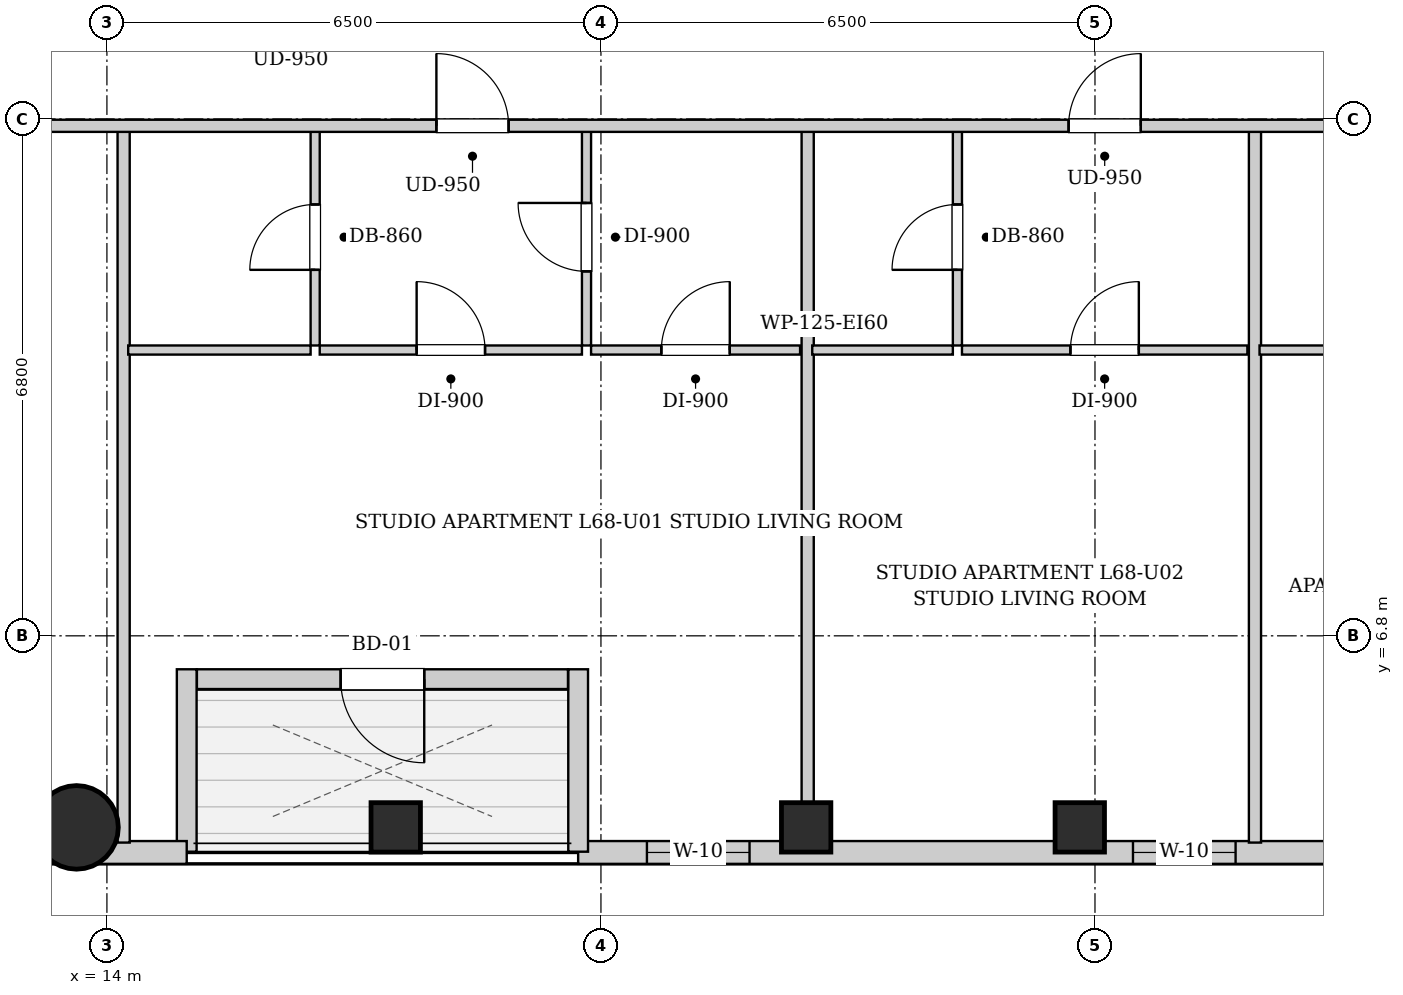
"""IFC4 building model, lengths in metres.
Left out: names, types, materials, properties, quantities, classifications, styles, units other than length and angle.
Written with IfcOpenShell. Run it as: python <this file> out.ifc"""

import sys

from ifc_helpers import new_model, si_unit, direction, frame, frame_2d, origin, origin_2d, place, context, subcontext, project, spatial, rectangle, circle, extrude, element, fill, save


model = new_model("IFC4")
c1 = context("Model", 3, precision=1e-05, world=origin(), true_north=direction((0.0, 1.0)))
c2 = subcontext(c1, "Body", "Model", "MODEL_VIEW")
j1 = project(units=[si_unit("LENGTHUNIT", "METRE"), si_unit("PLANEANGLEUNIT", "RADIAN")], contexts=[c1])
p1 = place(None, origin())
s1 = spatial("IfcSite", under=j1, at=p1, CompositionType="ELEMENT")
p2 = place(p1, origin())
s2 = spatial("IfcBuilding", under=s1, at=p2, CompositionType="ELEMENT")
p3 = place(p2, frame((0.0, 0.0, 234.3)))
s3 = spatial("IfcBuildingStorey", under=s2, at=p3, CompositionType="ELEMENT", Elevation=234.3)
p4 = place(p3, frame((13.6, 4.28, 0.0), z_axis=(0.0, 0.0, 1.0), x_axis=(1.0, 0.0, 0.0)))
e1 = element("IfcColumn", 1, at=p4, inside=s3, PredefinedType="COLUMN", context=c2, shape_type="SweptSolid", body=[
    extrude(circle(Radius=0.55, at=origin_2d()), origin(), (0.0, 0.0, 1.0), 3.4),
])
for number, where, z_axis, x_axis in (
    (2, (17.8, 4.28, 0.0), (0.0, 0.0, 1.0), (1.0, 0.0, 0.0)),
    (3, (23.2, 4.28, 0.0), (0.0, 0.0, 1.0), (1.0, 0.0, 0.0)),
    (4, (26.8, 4.28, 0.0), (0.0, 0.0, 1.0), (1.0, 0.0, 0.0)),
):
    element("IfcColumn", number, at=place(p3, frame(where, z_axis=z_axis, x_axis=x_axis)), inside=s3, PredefinedType="COLUMN", context=c2, shape_type="SweptSolid", body=[
        extrude(rectangle(XDim=0.65, YDim=0.65, at=origin_2d()), origin(), (0.0, 0.0, 1.0), 3.4),
    ])
p5 = place(p3, frame((37.8, 3.95, 0.0), z_axis=(0.0, 0.0, 1.0), x_axis=(-1.0, 0.0, 0.0)))
e5 = element("IfcWall", 5, at=p5, inside=s3, PredefinedType="SOLIDWALL", context=c2, shape_type="SweptSolid", body=[
    extrude(rectangle(XDim=17.6, YDim=0.3, at=frame_2d((8.8, 0.0))), origin(), (0.0, 0.0, 1.0), 3.14),
])
p6 = place(p5, frame((15.345, 0.0, 0.55)))
e6 = element("IfcOpeningElement", 6, at=p6, cuts=e5, PredefinedType="OPENING", context=c2, shape_type="SweptSolid", body=[
    extrude(rectangle(XDim=1.35, YDim=1.2, at=frame_2d((0.675, 0.6))), frame((0.0, 0.16, 0.0), z_axis=(0.0, -1.0, 0.0), x_axis=(1.0, 0.0, 0.0)), (0.0, 0.0, 1.0), 0.32),
])
p7 = place(p5, frame((8.95, 0.0, 0.55)))
e7 = element("IfcOpeningElement", 7, at=p7, cuts=e5, PredefinedType="OPENING", context=c2, shape_type="SweptSolid", body=[
    extrude(rectangle(XDim=1.35, YDim=1.2, at=frame_2d((0.675, 0.6))), frame((0.0, 0.16, 0.0), z_axis=(0.0, -1.0, 0.0), x_axis=(1.0, 0.0, 0.0)), (0.0, 0.0, 1.0), 0.32),
])
p8 = place(p5, frame((5.085, 0.0, 0.55)))
e8 = element("IfcOpeningElement", 8, at=p8, cuts=e5, PredefinedType="OPENING", context=c2, shape_type="SweptSolid", body=[
    extrude(rectangle(XDim=1.35, YDim=1.2, at=frame_2d((0.675, 0.6))), frame((0.0, 0.16, 0.0), z_axis=(0.0, -1.0, 0.0), x_axis=(1.0, 0.0, 0.0)), (0.0, 0.0, 1.0), 0.32),
])
p9 = place(p5, frame((2.757, 0.0, 0.55)))
e9 = element("IfcOpeningElement", 9, at=p9, cuts=e5, PredefinedType="OPENING", context=c2, shape_type="SweptSolid", body=[
    extrude(rectangle(XDim=1.35, YDim=1.2, at=frame_2d((0.675, 0.6))), frame((0.0, 0.16, 0.0), z_axis=(0.0, -1.0, 0.0), x_axis=(1.0, 0.0, 0.0)), (0.0, 0.0, 1.0), 0.32),
])
p10 = place(p3, frame((20.2, 3.96, 0.0), z_axis=(0.0, 0.0, 1.0), x_axis=(0.0, 1.0, 0.0)))
e10 = element("IfcWall", 10, at=p10, inside=s3, PredefinedType="SOLIDWALL", context=c2, shape_type="SweptSolid", body=[
    extrude(rectangle(XDim=2.4, YDim=0.26, at=frame_2d((1.2, 0.0))), origin(), (0.0, 0.0, 1.0), 3.14),
])
p11 = place(p3, frame((20.066, 6.23, 0.0), z_axis=(0.0, 0.0, 1.0), x_axis=(-1.0, 0.0, 0.0)))
e11 = element("IfcWall", 11, at=p11, inside=s3, PredefinedType="SOLIDWALL", context=c2, shape_type="SweptSolid", body=[
    extrude(rectangle(XDim=4.882, YDim=0.26, at=frame_2d((2.441, 0.0))), origin(), (0.0, 0.0, 1.0), 3.14),
])
p12 = place(p11, frame((1.891, 0.0, 0.0)))
e12 = element("IfcOpeningElement", 12, at=p12, cuts=e11, PredefinedType="OPENING", context=c2, shape_type="SweptSolid", body=[
    extrude(rectangle(XDim=1.1, YDim=2.0, at=frame_2d((0.55, 1.0))), frame((0.0, 0.14, 0.0), z_axis=(0.0, -1.0, 0.0), x_axis=(1.0, 0.0, 0.0)), (0.0, 0.0, 1.0), 0.28),
])
p13 = place(p3, frame((15.05, 6.36, 0.0), z_axis=(0.0, 0.0, 1.0), x_axis=(0.0, -1.0, 0.0)))
e13 = element("IfcWall", 13, at=p13, inside=s3, PredefinedType="SOLIDWALL", context=c2, shape_type="SweptSolid", body=[
    extrude(rectangle(XDim=2.4, YDim=0.26, at=frame_2d((1.2, 0.0))), origin(), (0.0, 0.0, 1.0), 3.14),
])
p14 = place(p3, frame((15.05, 3.95, 0.0), z_axis=(0.0, 0.0, 1.0), x_axis=(-1.0, 0.0, 0.0)))
e14 = element("IfcWall", 14, at=p14, inside=s3, PredefinedType="SOLIDWALL", context=c2, shape_type="SweptSolid", body=[
    extrude(rectangle(XDim=1.95, YDim=0.3, at=frame_2d((0.975, 0.0))), origin(), (0.0, 0.0, 1.0), 3.14),
])
p15 = place(p3, frame((14.22, 4.08, 0.0), z_axis=(0.0, 0.0, 1.0), x_axis=(0.0, 1.0, 0.0)))
e15 = element("IfcWall", 15, at=p15, inside=s3, PredefinedType="PARTITIONING", context=c2, shape_type="SweptSolid", body=[
    extrude(rectangle(XDim=9.39, YDim=0.16, at=frame_2d((4.695, 0.0))), origin(), (0.0, 0.0, 1.0), 3.14),
])
p16 = place(p3, frame((16.74, 10.62, 0.0), z_axis=(0.0, 0.0, 1.0), x_axis=(0.0, 1.0, 0.0)))
e16 = element("IfcWall", 16, at=p16, inside=s3, PredefinedType="PARTITIONING", context=c2, shape_type="SweptSolid", body=[
    extrude(rectangle(XDim=2.85, YDim=0.12, at=frame_2d((1.425, 0.0))), origin(), (0.0, 0.0, 1.0), 3.14),
])
p17 = place(p16, frame((0.995, 0.0, 0.0)))
e17 = element("IfcOpeningElement", 17, at=p17, cuts=e16, PredefinedType="OPENING", context=c2, shape_type="SweptSolid", body=[
    extrude(rectangle(XDim=0.86, YDim=2.05, at=frame_2d((0.43, 1.025))), frame((0.0, 0.07, 0.0), z_axis=(0.0, -1.0, 0.0), x_axis=(1.0, 0.0, 0.0)), (0.0, 0.0, 1.0), 0.14),
])
p18 = place(p3, frame((14.28, 10.56, 0.0), z_axis=(0.0, 0.0, 1.0), x_axis=(1.0, 0.0, 0.0)))
e18 = element("IfcWall", 18, at=p18, inside=s3, PredefinedType="PARTITIONING", context=c2, shape_type="SweptSolid", body=[
    extrude(rectangle(XDim=2.4, YDim=0.12, at=frame_2d((1.2, 0.0))), origin(), (0.0, 0.0, 1.0), 3.14),
])
p19 = place(p3, frame((20.31, 10.62, 0.0), z_axis=(0.0, 0.0, 1.0), x_axis=(0.0, 1.0, 0.0)))
e19 = element("IfcWall", 19, at=p19, inside=s3, PredefinedType="PARTITIONING", context=c2, shape_type="SweptSolid", body=[
    extrude(rectangle(XDim=2.85, YDim=0.12, at=frame_2d((1.425, 0.0))), origin(), (0.0, 0.0, 1.0), 3.14),
])
p20 = place(p19, frame((0.975, 0.0, 0.0)))
e20 = element("IfcOpeningElement", 20, at=p20, cuts=e19, PredefinedType="OPENING", context=c2, shape_type="SweptSolid", body=[
    extrude(rectangle(XDim=0.9, YDim=2.05, at=frame_2d((0.45, 1.025))), frame((0.0, 0.07, 0.0), z_axis=(0.0, -1.0, 0.0), x_axis=(1.0, 0.0, 0.0)), (0.0, 0.0, 1.0), 0.14),
])
p21 = place(p3, frame((16.8, 10.56, 0.0), z_axis=(0.0, 0.0, 1.0), x_axis=(1.0, 0.0, 0.0)))
e21 = element("IfcWall", 21, at=p21, inside=s3, PredefinedType="PARTITIONING", context=c2, shape_type="SweptSolid", body=[
    extrude(rectangle(XDim=3.45, YDim=0.12, at=frame_2d((1.725, 0.0))), origin(), (0.0, 0.0, 1.0), 3.14),
])
p22 = place(p21, frame((1.275, 0.0, 0.0)))
e22 = element("IfcOpeningElement", 22, at=p22, cuts=e21, PredefinedType="OPENING", context=c2, shape_type="SweptSolid", body=[
    extrude(rectangle(XDim=0.9, YDim=2.05, at=frame_2d((0.45, 1.025))), frame((0.0, 0.07, 0.0), z_axis=(0.0, -1.0, 0.0), x_axis=(1.0, 0.0, 0.0)), (0.0, 0.0, 1.0), 0.14),
])
p23 = place(p3, frame((20.37, 10.56, 0.0), z_axis=(0.0, 0.0, 1.0), x_axis=(1.0, 0.0, 0.0)))
e23 = element("IfcWall", 23, at=p23, inside=s3, PredefinedType="PARTITIONING", context=c2, shape_type="SweptSolid", body=[
    extrude(rectangle(XDim=2.75, YDim=0.12, at=frame_2d((1.375, 0.0))), origin(), (0.0, 0.0, 1.0), 3.14),
])
p24 = place(p23, frame((0.925, 0.0, 0.0)))
e24 = element("IfcOpeningElement", 24, at=p24, cuts=e23, PredefinedType="OPENING", context=c2, shape_type="SweptSolid", body=[
    extrude(rectangle(XDim=0.9, YDim=2.05, at=frame_2d((0.45, 1.025))), frame((0.0, 0.07, 0.0), z_axis=(0.0, -1.0, 0.0), x_axis=(1.0, 0.0, 0.0)), (0.0, 0.0, 1.0), 0.14),
])
p25 = place(p3, frame((23.22, 4.08, 0.0), z_axis=(0.0, 0.0, 1.0), x_axis=(0.0, 1.0, 0.0)))
e25 = element("IfcWall", 25, at=p25, inside=s3, PredefinedType="PARTITIONING", context=c2, shape_type="SweptSolid", body=[
    extrude(rectangle(XDim=9.39, YDim=0.16, at=frame_2d((4.695, 0.0))), origin(), (0.0, 0.0, 1.0), 3.14),
])
p26 = place(p3, frame((25.19, 10.62, 0.0), z_axis=(0.0, 0.0, 1.0), x_axis=(0.0, 1.0, 0.0)))
e26 = element("IfcWall", 26, at=p26, inside=s3, PredefinedType="PARTITIONING", context=c2, shape_type="SweptSolid", body=[
    extrude(rectangle(XDim=2.85, YDim=0.12, at=frame_2d((1.425, 0.0))), origin(), (0.0, 0.0, 1.0), 3.14),
])
p27 = place(p26, frame((0.995, 0.0, 0.0)))
e27 = element("IfcOpeningElement", 27, at=p27, cuts=e26, PredefinedType="OPENING", context=c2, shape_type="SweptSolid", body=[
    extrude(rectangle(XDim=0.86, YDim=2.05, at=frame_2d((0.43, 1.025))), frame((0.0, 0.07, 0.0), z_axis=(0.0, -1.0, 0.0), x_axis=(1.0, 0.0, 0.0)), (0.0, 0.0, 1.0), 0.14),
])
p28 = place(p3, frame((23.28, 10.56, 0.0), z_axis=(0.0, 0.0, 1.0), x_axis=(1.0, 0.0, 0.0)))
e28 = element("IfcWall", 28, at=p28, inside=s3, PredefinedType="PARTITIONING", context=c2, shape_type="SweptSolid", body=[
    extrude(rectangle(XDim=1.85, YDim=0.12, at=frame_2d((0.925, 0.0))), origin(), (0.0, 0.0, 1.0), 3.14),
])
p29 = place(p3, frame((25.25, 10.56, 0.0), z_axis=(0.0, 0.0, 1.0), x_axis=(1.0, 0.0, 0.0)))
e29 = element("IfcWall", 29, at=p29, inside=s3, PredefinedType="PARTITIONING", context=c2, shape_type="SweptSolid", body=[
    extrude(rectangle(XDim=3.755, YDim=0.12, at=frame_2d((1.877, 0.0))), origin(), (0.0, 0.0, 1.0), 3.14),
])
p30 = place(p29, frame((1.427, 0.0, 0.0)))
e30 = element("IfcOpeningElement", 30, at=p30, cuts=e29, PredefinedType="OPENING", context=c2, shape_type="SweptSolid", body=[
    extrude(rectangle(XDim=0.9, YDim=2.05, at=frame_2d((0.45, 1.025))), frame((0.0, 0.07, 0.0), z_axis=(0.0, -1.0, 0.0), x_axis=(1.0, 0.0, 0.0)), (0.0, 0.0, 1.0), 0.14),
])
p31 = place(p3, frame((29.105, 4.08, 0.0), z_axis=(0.0, 0.0, 1.0), x_axis=(0.0, 1.0, 0.0)))
e31 = element("IfcWall", 31, at=p31, inside=s3, PredefinedType="PARTITIONING", context=c2, shape_type="SweptSolid", body=[
    extrude(rectangle(XDim=9.39, YDim=0.16, at=frame_2d((4.695, 0.0))), origin(), (0.0, 0.0, 1.0), 3.14),
])
p32 = place(p3, frame((29.165, 10.56, 0.0), z_axis=(0.0, 0.0, 1.0), x_axis=(1.0, 0.0, 0.0)))
e32 = element("IfcWall", 32, at=p32, inside=s3, PredefinedType="PARTITIONING", context=c2, shape_type="SweptSolid", body=[
    extrude(rectangle(XDim=2.4, YDim=0.12, at=frame_2d((1.2, 0.0))), origin(), (0.0, 0.0, 1.0), 3.14),
])
p33 = place(p3, frame((13.15, 13.51, 0.0), z_axis=(0.0, 0.0, 1.0), x_axis=(1.0, 0.0, 0.0)))
e33 = element("IfcWall", 33, at=p33, inside=s3, PredefinedType="PARTITIONING", context=c2, shape_type="SweptSolid", body=[
    extrude(rectangle(XDim=24.6, YDim=0.16, at=frame_2d((12.3, 0.0))), origin(), (0.0, 0.0, 1.0), 3.14),
])
p34 = place(p33, frame((5.185, 0.0, 0.0)))
e34 = element("IfcOpeningElement", 34, at=p34, cuts=e33, PredefinedType="OPENING", context=c2, shape_type="SweptSolid", body=[
    extrude(rectangle(XDim=0.95, YDim=2.1, at=frame_2d((0.475, 1.05))), frame((0.0, 0.09, 0.0), z_axis=(0.0, -1.0, 0.0), x_axis=(1.0, 0.0, 0.0)), (0.0, 0.0, 1.0), 0.18),
])
p35 = place(p33, frame((13.503, 0.0, 0.0)))
e35 = element("IfcOpeningElement", 35, at=p35, cuts=e33, PredefinedType="OPENING", context=c2, shape_type="SweptSolid", body=[
    extrude(rectangle(XDim=0.95, YDim=2.1, at=frame_2d((0.475, 1.05))), frame((0.0, 0.09, 0.0), z_axis=(0.0, -1.0, 0.0), x_axis=(1.0, 0.0, 0.0)), (0.0, 0.0, 1.0), 0.18),
])
p36 = place(p33, frame((20.585, 0.0, 0.0)))
e36 = element("IfcOpeningElement", 36, at=p36, cuts=e33, PredefinedType="OPENING", context=c2, shape_type="SweptSolid", body=[
    extrude(rectangle(XDim=0.95, YDim=2.1, at=frame_2d((0.475, 1.05))), frame((0.0, 0.09, 0.0), z_axis=(0.0, -1.0, 0.0), x_axis=(1.0, 0.0, 0.0)), (0.0, 0.0, 1.0), 0.18),
])
p37 = place(p17, origin())
e37 = element("IfcDoor", 37, at=p37, inside=s3, OperationType="SINGLE_SWING_LEFT", PredefinedType="DOOR", context=c2, shape_type="SweptSolid", body=[
    extrude(rectangle(XDim=0.86, YDim=2.05, at=frame_2d((0.43, 1.025))), frame((0.0, 0.025, 0.0), z_axis=(0.0, -1.0, 0.0), x_axis=(1.0, 0.0, 0.0)), (0.0, 0.0, 1.0), 0.05),
])
fill(e17, e37)
p38 = place(p20, origin())
e38 = element("IfcDoor", 38, at=p38, inside=s3, OperationType="SINGLE_SWING_RIGHT", PredefinedType="DOOR", context=c2, shape_type="SweptSolid", body=[
    extrude(rectangle(XDim=0.9, YDim=2.05, at=frame_2d((0.45, 1.025))), frame((0.0, 0.025, 0.0), z_axis=(0.0, -1.0, 0.0), x_axis=(1.0, 0.0, 0.0)), (0.0, 0.0, 1.0), 0.05),
])
fill(e20, e38)
p39 = place(p22, origin())
e39 = element("IfcDoor", 39, at=p39, inside=s3, OperationType="SINGLE_SWING_LEFT", PredefinedType="DOOR", context=c2, shape_type="SweptSolid", body=[
    extrude(rectangle(XDim=0.9, YDim=2.05, at=frame_2d((0.45, 1.025))), frame((0.0, 0.025, 0.0), z_axis=(0.0, -1.0, 0.0), x_axis=(1.0, 0.0, 0.0)), (0.0, 0.0, 1.0), 0.05),
])
fill(e22, e39)
p40 = place(p24, origin())
e40 = element("IfcDoor", 40, at=p40, inside=s3, OperationType="SINGLE_SWING_RIGHT", PredefinedType="DOOR", context=c2, shape_type="SweptSolid", body=[
    extrude(rectangle(XDim=0.9, YDim=2.05, at=frame_2d((0.45, 1.025))), frame((0.0, 0.025, 0.0), z_axis=(0.0, -1.0, 0.0), x_axis=(1.0, 0.0, 0.0)), (0.0, 0.0, 1.0), 0.05),
])
fill(e24, e40)
p41 = place(p27, origin())
e41 = element("IfcDoor", 41, at=p41, inside=s3, OperationType="SINGLE_SWING_LEFT", PredefinedType="DOOR", context=c2, shape_type="SweptSolid", body=[
    extrude(rectangle(XDim=0.86, YDim=2.05, at=frame_2d((0.43, 1.025))), frame((0.0, 0.025, 0.0), z_axis=(0.0, -1.0, 0.0), x_axis=(1.0, 0.0, 0.0)), (0.0, 0.0, 1.0), 0.05),
])
fill(e27, e41)
p42 = place(p30, origin())
e42 = element("IfcDoor", 42, at=p42, inside=s3, OperationType="SINGLE_SWING_RIGHT", PredefinedType="DOOR", context=c2, shape_type="SweptSolid", body=[
    extrude(rectangle(XDim=0.9, YDim=2.05, at=frame_2d((0.45, 1.025))), frame((0.0, 0.025, 0.0), z_axis=(0.0, -1.0, 0.0), x_axis=(1.0, 0.0, 0.0)), (0.0, 0.0, 1.0), 0.05),
])
fill(e30, e42)
p43 = place(p34, origin())
e43 = element("IfcDoor", 43, at=p43, inside=s3, OperationType="SINGLE_SWING_LEFT", PredefinedType="DOOR", context=c2, shape_type="SweptSolid", body=[
    extrude(rectangle(XDim=0.95, YDim=2.1, at=frame_2d((0.475, 1.05))), frame((0.0, 0.025, 0.0), z_axis=(0.0, -1.0, 0.0), x_axis=(1.0, 0.0, 0.0)), (0.0, 0.0, 1.0), 0.05),
])
fill(e34, e43)
p44 = place(p35, origin())
e44 = element("IfcDoor", 44, at=p44, inside=s3, OperationType="SINGLE_SWING_RIGHT", PredefinedType="DOOR", context=c2, shape_type="SweptSolid", body=[
    extrude(rectangle(XDim=0.95, YDim=2.1, at=frame_2d((0.475, 1.05))), frame((0.0, 0.025, 0.0), z_axis=(0.0, -1.0, 0.0), x_axis=(1.0, 0.0, 0.0)), (0.0, 0.0, 1.0), 0.05),
])
fill(e35, e44)
p45 = place(p12, origin())
e45 = element("IfcDoor", 45, at=p45, inside=s3, OperationType="SINGLE_SWING_LEFT", PredefinedType="DOOR", context=c2, shape_type="SweptSolid", body=[
    extrude(rectangle(XDim=1.1, YDim=2.0, at=frame_2d((0.55, 1.0))), frame((0.0, 0.025, 0.0), z_axis=(0.0, -1.0, 0.0), x_axis=(1.0, 0.0, 0.0)), (0.0, 0.0, 1.0), 0.05),
])
fill(e12, e45)
p46 = place(p6, origin())
e46 = element("IfcWindow", 46, at=p46, inside=s3, PartitioningType="SINGLE_PANEL", PredefinedType="WINDOW", context=c2, shape_type="SweptSolid", body=[
    extrude(rectangle(XDim=1.35, YDim=1.2, at=frame_2d((0.675, 0.6))), frame((0.0, 0.03, 0.0), z_axis=(0.0, -1.0, 0.0), x_axis=(1.0, 0.0, 0.0)), (0.0, 0.0, 1.0), 0.06),
])
fill(e6, e46)
p47 = place(p7, origin())
e47 = element("IfcWindow", 47, at=p47, inside=s3, PartitioningType="SINGLE_PANEL", PredefinedType="WINDOW", context=c2, shape_type="SweptSolid", body=[
    extrude(rectangle(XDim=1.35, YDim=1.2, at=frame_2d((0.675, 0.6))), frame((0.0, 0.03, 0.0), z_axis=(0.0, -1.0, 0.0), x_axis=(1.0, 0.0, 0.0)), (0.0, 0.0, 1.0), 0.06),
])
fill(e7, e47)
save(model, sys.argv[1])
